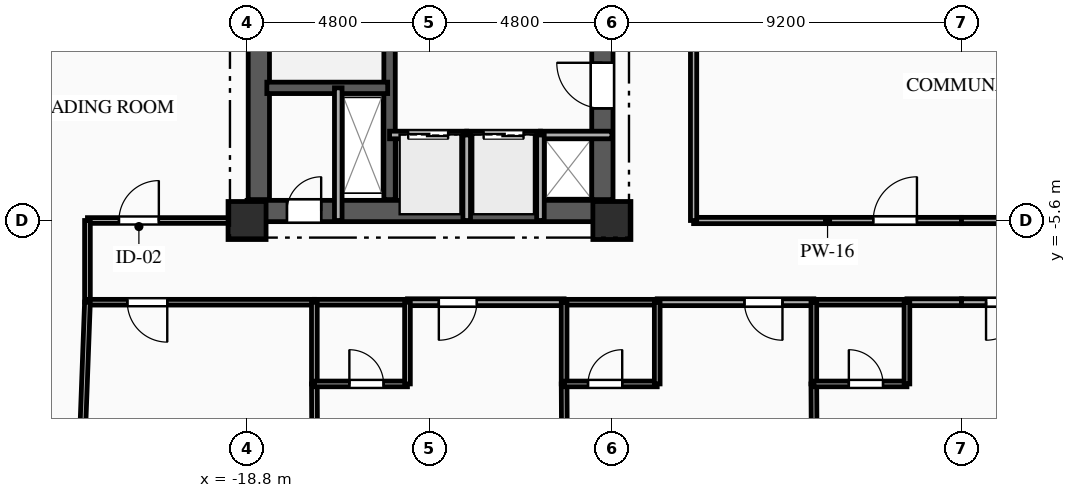
"""IFC4 building model, lengths in metres.
Left out: names, types, materials, properties, quantities, classifications, styles, units other than length and angle.
Written with IfcOpenShell. Run it as: python <this file> out.ifc"""

import sys

from ifc_helpers import new_model, si_unit, direction, frame, frame_2d, origin, origin_2d, place, context, subcontext, project, spatial, rectangle, extrude, element, fill, save


model = new_model("IFC4")
c1 = context("Model", 3, precision=1e-05, world=origin(), true_north=direction((0.0, 1.0)))
c2 = subcontext(c1, "Body", "Model", "MODEL_VIEW")
j1 = project(units=[si_unit("LENGTHUNIT", "METRE"), si_unit("PLANEANGLEUNIT", "RADIAN")], contexts=[c1])
p1 = place(None, origin())
s1 = spatial("IfcSite", under=j1, at=p1, CompositionType="ELEMENT")
p2 = place(p1, origin())
s2 = spatial("IfcBuilding", under=s1, at=p2, CompositionType="ELEMENT")
p3 = place(p2, frame((0.0, 0.0, 119.2)))
s3 = spatial("IfcBuildingStorey", under=s2, at=p3, CompositionType="ELEMENT", Elevation=119.2)
for number, where, z_axis, x_axis in (
    (1, (-18.8, -5.6, 0.0), (0.0, 0.0, 1.0), (1.0, 0.0, 0.0)),
    (2, (-9.2, -5.6, 0.0), (0.0, 0.0, 1.0), (1.0, 0.0, 0.0)),
):
    element("IfcColumn", number, at=place(p3, frame(where, z_axis=z_axis, x_axis=x_axis)), inside=s3, PredefinedType="COLUMN", context=c2, shape_type="SweptSolid", body=[
        extrude(rectangle(XDim=1.0, YDim=1.0, at=origin_2d()), origin(), (0.0, 0.0, 1.0), 3.35),
    ])
p4 = place(p3, frame((-18.8, -5.35, 0.0), z_axis=(0.0, 0.0, 1.0), x_axis=(1.0, 0.0, 0.0)))
e3 = element("IfcWall", 3, at=p4, inside=s3, PredefinedType="SHEAR", context=c2, shape_type="SweptSolid", body=[
    extrude(rectangle(XDim=9.6, YDim=0.56, at=frame_2d((4.8, 0.0))), origin(), (0.0, 0.0, 1.0), 3.045),
])
p5 = place(p4, frame((1.05, 0.0, 0.0)))
e4 = element("IfcOpeningElement", 4, at=p5, cuts=e3, PredefinedType="OPENING", context=c2, shape_type="SweptSolid", body=[
    extrude(rectangle(XDim=0.9, YDim=2.1, at=frame_2d((0.45, 1.05))), frame((0.0, 0.29, 0.0), z_axis=(0.0, -1.0, 0.0), x_axis=(1.0, 0.0, 0.0)), (0.0, 0.0, 1.0), 0.58),
])
p6 = place(p3, frame((-18.49, -5.05, 0.0), z_axis=(0.0, 0.0, 1.0), x_axis=(0.0, 1.0, 0.0)))
e5 = element("IfcWall", 5, at=p6, inside=s3, PredefinedType="SHEAR", context=c2, shape_type="SweptSolid", body=[
    extrude(rectangle(XDim=10.1, YDim=0.56, at=frame_2d((5.05, 0.0))), origin(), (0.0, 0.0, 1.0), 3.045),
])
p7 = place(p3, frame((-9.45, -5.05, 0.0), z_axis=(0.0, 0.0, 1.0), x_axis=(0.0, 1.0, 0.0)))
e6 = element("IfcWall", 6, at=p7, inside=s3, PredefinedType="SHEAR", context=c2, shape_type="SweptSolid", body=[
    extrude(rectangle(XDim=10.1, YDim=0.56, at=frame_2d((5.05, 0.0))), origin(), (0.0, 0.0, 1.0), 3.045),
])
p8 = place(p7, frame((7.15, 0.0, 0.0)))
e7 = element("IfcOpeningElement", 7, at=p8, cuts=e6, PredefinedType="OPENING", context=c2, shape_type="SweptSolid", body=[
    extrude(rectangle(XDim=0.9, YDim=2.1, at=frame_2d((0.45, 1.05))), frame((0.0, 0.29, 0.0), z_axis=(0.0, -1.0, 0.0), x_axis=(1.0, 0.0, 0.0)), (0.0, 0.0, 1.0), 0.58),
])
p9 = place(p7, frame((2.4, 0.0, 0.0)))
e8 = element("IfcOpeningElement", 8, at=p9, cuts=e6, PredefinedType="OPENING", context=c2, shape_type="SweptSolid", body=[
    extrude(rectangle(XDim=1.2, YDim=2.15, at=frame_2d((0.6, 1.075))), frame((0.0, 0.29, 0.0), z_axis=(0.0, -1.0, 0.0), x_axis=(1.0, 0.0, 0.0)), (0.0, 0.0, 1.0), 0.58),
])
p10 = place(p3, frame((-15.05, -5.05, 0.0), z_axis=(0.0, 0.0, 1.0), x_axis=(0.0, 1.0, 0.0)))
e9 = element("IfcWall", 9, at=p10, inside=s3, PredefinedType="SHEAR", context=c2, shape_type="SweptSolid", body=[
    extrude(rectangle(XDim=10.1, YDim=0.3, at=frame_2d((5.05, 0.0))), origin(), (0.0, 0.0, 1.0), 3.045),
])
p11 = place(p3, frame((-18.28, -2.11, 0.0), z_axis=(0.0, 0.0, 1.0), x_axis=(1.0, 0.0, 0.0)))
e10 = element("IfcWall", 10, at=p11, inside=s3, PredefinedType="SHEAR", context=c2, shape_type="SweptSolid", body=[
    extrude(rectangle(XDim=3.18, YDim=0.3, at=frame_2d((1.59, 0.0))), origin(), (0.0, 0.0, 1.0), 3.045),
])
p12 = place(p3, frame((-16.4, -5.6, 0.0), z_axis=(0.0, 0.0, 1.0), x_axis=(0.0, 1.0, 0.0)))
e11 = element("IfcWall", 11, at=p12, inside=s3, PredefinedType="PARTITIONING", context=c2, shape_type="SweptSolid", body=[
    extrude(rectangle(XDim=3.49, YDim=0.2, at=frame_2d((1.745, 0.0))), origin(), (0.0, 0.0, 1.0), 3.045),
])
p13 = place(p3, frame((-15.05, -3.35, 0.0), z_axis=(0.0, 0.0, 1.0), x_axis=(1.0, 0.0, 0.0)))
e12 = element("IfcWall", 12, at=p13, inside=s3, PredefinedType="PARTITIONING", context=c2, shape_type="SweptSolid", body=[
    extrude(rectangle(XDim=2.03, YDim=0.2, at=frame_2d((1.015, 0.0))), origin(), (0.0, 0.0, 1.0), 3.045),
])
p14 = place(p13, frame((0.49, 0.0, 0.0)))
e13 = element("IfcOpeningElement", 13, at=p14, cuts=e12, PredefinedType="OPENING", context=c2, shape_type="SweptSolid", body=[
    extrude(rectangle(XDim=1.05, YDim=2.1, at=frame_2d((0.525, 1.05))), frame((0.0, 0.11, 0.0), z_axis=(0.0, -1.0, 0.0), x_axis=(1.0, 0.0, 0.0)), (0.0, 0.0, 1.0), 0.22),
])
p15 = place(p3, frame((-13.02, -3.35, 0.0), z_axis=(0.0, 0.0, 1.0), x_axis=(1.0, 0.0, 0.0)))
e14 = element("IfcWall", 14, at=p15, inside=s3, PredefinedType="PARTITIONING", context=c2, shape_type="SweptSolid", body=[
    extrude(rectangle(XDim=1.94, YDim=0.2, at=frame_2d((0.97, 0.0))), origin(), (0.0, 0.0, 1.0), 3.045),
])
p16 = place(p15, frame((0.445, 0.0, 0.0)))
e15 = element("IfcOpeningElement", 15, at=p16, cuts=e14, PredefinedType="OPENING", context=c2, shape_type="SweptSolid", body=[
    extrude(rectangle(XDim=1.05, YDim=2.1, at=frame_2d((0.525, 1.05))), frame((0.0, 0.11, 0.0), z_axis=(0.0, -1.0, 0.0), x_axis=(1.0, 0.0, 0.0)), (0.0, 0.0, 1.0), 0.22),
])
p17 = place(p3, frame((-11.08, -3.35, 0.0), z_axis=(0.0, 0.0, 1.0), x_axis=(1.0, 0.0, 0.0)))
e16 = element("IfcWall", 16, at=p17, inside=s3, PredefinedType="PARTITIONING", context=c2, shape_type="SweptSolid", body=[
    extrude(rectangle(XDim=1.88, YDim=0.2, at=frame_2d((0.94, 0.0))), origin(), (0.0, 0.0, 1.0), 2.76),
])
for number, where, z_axis, x_axis in (
    (17, (-13.02, -5.6, 0.0), (0.0, 0.0, 1.0), (0.0, 1.0, 0.0)),
    (18, (-11.08, -5.6, 0.0), (0.0, 0.0, 1.0), (0.0, 1.0, 0.0)),
):
    element("IfcWall", number, at=place(p3, frame(where, z_axis=z_axis, x_axis=x_axis)), inside=s3, PredefinedType="PARTITIONING", context=c2, shape_type="SweptSolid", body=[
        extrude(rectangle(XDim=2.25, YDim=0.2, at=frame_2d((1.125, 0.0))), origin(), (0.0, 0.0, 1.0), 3.045),
    ])
p18 = place(p3, frame((-23.0, -5.6, 0.0), z_axis=(0.0, 0.0, 1.0), x_axis=(1.0, 0.0, 0.0)))
e19 = element("IfcWall", 19, at=p18, inside=s3, PredefinedType="PARTITIONING", context=c2, shape_type="SweptSolid", body=[
    extrude(rectangle(XDim=4.2, YDim=0.15, at=frame_2d((2.1, 0.0))), origin(), (0.0, 0.0, 1.0), 3.045),
])
p19 = place(p18, frame((0.829, 0.0, 0.0)))
e20 = element("IfcOpeningElement", 20, at=p19, cuts=e19, PredefinedType="OPENING", context=c2, shape_type="SweptSolid", body=[
    extrude(rectangle(XDim=1.05, YDim=2.15, at=frame_2d((0.525, 1.075))), frame((0.0, 0.085, 0.0), z_axis=(0.0, -1.0, 0.0), x_axis=(1.0, 0.0, 0.0)), (0.0, 0.0, 1.0), 0.17),
])
p20 = place(p3, frame((-23.0, -7.75, 0.0), z_axis=(0.0, 0.0, 1.0), x_axis=(0.0, 1.0, 0.0)))
e21 = element("IfcWall", 21, at=p20, inside=s3, PredefinedType="PARTITIONING", context=c2, shape_type="SweptSolid", body=[
    extrude(rectangle(XDim=2.15, YDim=0.15, at=frame_2d((1.075, 0.0))), origin(), (0.0, 0.0, 1.0), 2.7),
])
p21 = place(p3, frame((-17.029, -7.75, 0.0), z_axis=(0.0, 0.0, 1.0), x_axis=(-1.0, 0.0, 0.0)))
e22 = element("IfcWall", 22, at=p21, inside=s3, PredefinedType="PARTITIONING", context=c2, shape_type="SweptSolid", body=[
    extrude(rectangle(XDim=5.971, YDim=0.15, at=frame_2d((2.985, 0.0))), origin(), (0.0, 0.0, 1.0), 3.045),
])
p22 = place(p21, frame((3.871, 0.0, 0.0)))
e23 = element("IfcOpeningElement", 23, at=p22, cuts=e22, PredefinedType="OPENING", context=c2, shape_type="SweptSolid", body=[
    extrude(rectangle(XDim=1.05, YDim=2.15, at=frame_2d((0.525, 1.075))), frame((0.0, 0.085, 0.0), z_axis=(0.0, -1.0, 0.0), x_axis=(1.0, 0.0, 0.0)), (0.0, 0.0, 1.0), 0.17),
])
p23 = place(p3, frame((-10.457, -7.75, 0.0), z_axis=(0.0, 0.0, 1.0), x_axis=(-1.0, 0.0, 0.0)))
e24 = element("IfcWall", 24, at=p23, inside=s3, PredefinedType="PARTITIONING", context=c2, shape_type="SweptSolid", body=[
    extrude(rectangle(XDim=4.122, YDim=0.18, at=frame_2d((2.061, 0.0))), origin(), (0.0, 0.0, 1.0), 3.045),
])
p24 = place(p23, frame((2.297, 0.0, 0.0)))
e25 = element("IfcOpeningElement", 25, at=p24, cuts=e24, PredefinedType="OPENING", context=c2, shape_type="SweptSolid", body=[
    extrude(rectangle(XDim=1.0, YDim=2.15, at=frame_2d((0.5, 1.075))), frame((0.0, 0.1, 0.0), z_axis=(0.0, -1.0, 0.0), x_axis=(1.0, 0.0, 0.0)), (0.0, 0.0, 1.0), 0.2),
])
p25 = place(p3, frame((-14.579, -7.75, 0.0), z_axis=(0.0, 0.0, 1.0), x_axis=(-1.0, 0.0, 0.0)))
e26 = element("IfcWall", 26, at=p25, inside=s3, PredefinedType="PLUMBINGWALL", context=c2, shape_type="SweptSolid", body=[
    extrude(rectangle(XDim=2.45, YDim=0.15, at=frame_2d((1.225, 0.0))), origin(), (0.0, 0.0, 1.0), 3.045),
])
p26 = place(p3, frame((-3.886, -7.75, 0.0), z_axis=(0.0, 0.0, 1.0), x_axis=(-1.0, 0.0, 0.0)))
e27 = element("IfcWall", 27, at=p26, inside=s3, PredefinedType="PARTITIONING", context=c2, shape_type="SweptSolid", body=[
    extrude(rectangle(XDim=4.121, YDim=0.18, at=frame_2d((2.061, 0.0))), origin(), (0.0, 0.0, 1.0), 3.045),
])
p27 = place(p26, frame((0.825, 0.0, 0.0)))
e28 = element("IfcOpeningElement", 28, at=p27, cuts=e27, PredefinedType="OPENING", context=c2, shape_type="SweptSolid", body=[
    extrude(rectangle(XDim=1.0, YDim=2.15, at=frame_2d((0.5, 1.075))), frame((0.0, 0.1, 0.0), z_axis=(0.0, -1.0, 0.0), x_axis=(1.0, 0.0, 0.0)), (0.0, 0.0, 1.0), 0.2),
])
p28 = place(p3, frame((-8.007, -7.75, 0.0), z_axis=(0.0, 0.0, 1.0), x_axis=(-1.0, 0.0, 0.0)))
e29 = element("IfcWall", 29, at=p28, inside=s3, PredefinedType="PLUMBINGWALL", context=c2, shape_type="SweptSolid", body=[
    extrude(rectangle(XDim=2.45, YDim=0.15, at=frame_2d((1.225, 0.0))), origin(), (0.0, 0.0, 1.0), 3.045),
])
p29 = place(p3, frame((0.0, -7.75, 0.0), z_axis=(0.0, 0.0, 1.0), x_axis=(-1.0, 0.0, 0.0)))
e30 = element("IfcWall", 30, at=p29, inside=s3, PredefinedType="PARTITIONING", context=c2, shape_type="SweptSolid", body=[
    extrude(rectangle(XDim=1.436, YDim=0.18, at=frame_2d((0.718, 0.0))), origin(), (0.0, 0.0, 1.0), 3.045),
])
p30 = place(p3, frame((-1.436, -7.75, 0.0), z_axis=(0.0, 0.0, 1.0), x_axis=(-1.0, 0.0, 0.0)))
e31 = element("IfcWall", 31, at=p30, inside=s3, PredefinedType="PLUMBINGWALL", context=c2, shape_type="SweptSolid", body=[
    extrude(rectangle(XDim=2.45, YDim=0.15, at=frame_2d((1.225, 0.0))), origin(), (0.0, 0.0, 1.0), 3.045),
])
p31 = place(p3, frame((-7.05, -5.6, 0.0), z_axis=(0.0, 0.0, 1.0), x_axis=(1.0, 0.0, 0.0)))
e32 = element("IfcWall", 32, at=p31, inside=s3, PredefinedType="PARTITIONING", context=c2, shape_type="SweptSolid", body=[
    extrude(rectangle(XDim=7.05, YDim=0.165, at=frame_2d((3.525, 0.0))), origin(), (0.0, 0.0, 1.0), 2.53),
])
p32 = place(p31, frame((4.728, 0.0, 0.0)))
e33 = element("IfcOpeningElement", 33, at=p32, cuts=e32, PredefinedType="OPENING", context=c2, shape_type="SweptSolid", body=[
    extrude(rectangle(XDim=1.15, YDim=2.15, at=frame_2d((0.575, 1.075))), frame((0.0, 0.093, 0.0), z_axis=(0.0, -1.0, 0.0), x_axis=(1.0, 0.0, 0.0)), (0.0, 0.0, 1.0), 0.185),
])
p33 = place(p3, frame((2.686, -7.75, 0.0), z_axis=(0.0, 0.0, 1.0), x_axis=(-1.0, 0.0, 0.0)))
e34 = element("IfcWall", 34, at=p33, inside=s3, PredefinedType="PARTITIONING", context=c2, shape_type="SweptSolid", body=[
    extrude(rectangle(XDim=2.686, YDim=0.18, at=frame_2d((1.343, 0.0))), origin(), (0.0, 0.0, 1.0), 3.045),
])
p34 = place(p33, frame((1.04, 0.0, 0.0)))
e35 = element("IfcOpeningElement", 35, at=p34, cuts=e34, PredefinedType="OPENING", context=c2, shape_type="SweptSolid", body=[
    extrude(rectangle(XDim=1.0, YDim=2.15, at=frame_2d((0.5, 1.075))), frame((0.0, 0.1, 0.0), z_axis=(0.0, -1.0, 0.0), x_axis=(1.0, 0.0, 0.0)), (0.0, 0.0, 1.0), 0.2),
])
p35 = place(p3, frame((0.0, -5.6, 0.0), z_axis=(0.0, 0.0, 1.0), x_axis=(1.0, 0.0, 0.0)))
e36 = element("IfcWall", 36, at=p35, inside=s3, PredefinedType="PARTITIONING", context=c2, shape_type="SweptSolid", body=[
    extrude(rectangle(XDim=7.05, YDim=0.165, at=frame_2d((3.525, 0.0))), origin(), (0.0, 0.0, 1.0), 2.53),
])
p36 = place(p3, frame((-7.05, 1.45, 0.0), z_axis=(0.0, 0.0, 1.0), x_axis=(0.0, -1.0, 0.0)))
e37 = element("IfcWall", 37, at=p36, inside=s3, PredefinedType="PARTITIONING", context=c2, shape_type="SweptSolid", body=[
    extrude(rectangle(XDim=7.05, YDim=0.165, at=frame_2d((3.525, 0.0))), origin(), (0.0, 0.0, 1.0), 3.045),
])
p37 = place(p3, frame((-23.0, -7.75, 0.0), z_axis=(0.0, 0.0, 1.0), x_axis=(-0.036924695214, -0.999318050914, 0.0)))
e38 = element("IfcWall", 38, at=p37, inside=s3, PredefinedType="PARTITIONING", context=c2, shape_type="SweptSolid", body=[
    extrude(rectangle(XDim=10.176, YDim=0.15, at=frame_2d((5.088, 0.0))), origin(), (0.0, 0.0, 1.0), 3.045),
])
p38 = place(p3, frame((-17.029, -9.9, 0.0), z_axis=(0.0, 0.0, 1.0), x_axis=(0.004852348859, -0.999988227286, 0.0)))
e39 = element("IfcWall", 39, at=p38, inside=s3, PredefinedType="PARTITIONING", context=c2, shape_type="SweptSolid", body=[
    extrude(rectangle(XDim=9.056, YDim=0.15, at=frame_2d((4.528, 0.0))), origin(), (0.0, 0.0, 1.0), 3.045),
])
p39 = place(p3, frame((-17.029, -7.75, 0.0), z_axis=(0.0, 0.0, 1.0), x_axis=(0.0, -1.0, 0.0)))
e40 = element("IfcWall", 40, at=p39, inside=s3, PredefinedType="PLUMBINGWALL", context=c2, shape_type="SweptSolid", body=[
    extrude(rectangle(XDim=2.15, YDim=0.15, at=frame_2d((1.075, 0.0))), origin(), (0.0, 0.0, 1.0), 3.045),
])
p40 = place(p3, frame((-17.029, -9.9, 0.0), z_axis=(0.0, 0.0, 1.0), x_axis=(1.0, 0.0, 0.0)))
e41 = element("IfcWall", 41, at=p40, inside=s3, PredefinedType="PLUMBINGWALL", context=c2, shape_type="SweptSolid", body=[
    extrude(rectangle(XDim=2.45, YDim=0.15, at=frame_2d((1.225, 0.0))), origin(), (0.0, 0.0, 1.0), 3.045),
])
p41 = place(p40, frame((0.921, 0.0, 0.0)))
e42 = element("IfcOpeningElement", 42, at=p41, cuts=e41, PredefinedType="OPENING", context=c2, shape_type="SweptSolid", body=[
    extrude(rectangle(XDim=0.9, YDim=2.1, at=frame_2d((0.45, 1.05))), frame((0.0, 0.085, 0.0), z_axis=(0.0, -1.0, 0.0), x_axis=(1.0, 0.0, 0.0)), (0.0, 0.0, 1.0), 0.17),
])
p42 = place(p3, frame((-14.579, -9.9, 0.0), z_axis=(0.0, 0.0, 1.0), x_axis=(0.0, 1.0, 0.0)))
e43 = element("IfcWall", 43, at=p42, inside=s3, PredefinedType="PLUMBINGWALL", context=c2, shape_type="SweptSolid", body=[
    extrude(rectangle(XDim=2.15, YDim=0.15, at=frame_2d((1.075, 0.0))), origin(), (0.0, 0.0, 1.0), 3.045),
])
p43 = place(p3, frame((-10.457, -9.9, 0.0), z_axis=(0.0, 0.0, 1.0), x_axis=(0.005252948012, -0.999986203173, 0.0)))
e44 = element("IfcWall", 44, at=p43, inside=s3, PredefinedType="PARTITIONING", context=c2, shape_type="SweptSolid", body=[
    extrude(rectangle(XDim=8.366, YDim=0.15, at=frame_2d((4.183, 0.0))), origin(), (0.0, 0.0, 1.0), 3.045),
])
p44 = place(p3, frame((-10.457, -7.75, 0.0), z_axis=(0.0, 0.0, 1.0), x_axis=(0.0, -1.0, 0.0)))
e45 = element("IfcWall", 45, at=p44, inside=s3, PredefinedType="PLUMBINGWALL", context=c2, shape_type="SweptSolid", body=[
    extrude(rectangle(XDim=2.15, YDim=0.15, at=frame_2d((1.075, 0.0))), origin(), (0.0, 0.0, 1.0), 3.045),
])
p45 = place(p3, frame((-10.457, -9.9, 0.0), z_axis=(0.0, 0.0, 1.0), x_axis=(1.0, 0.0, 0.0)))
e46 = element("IfcWall", 46, at=p45, inside=s3, PredefinedType="PLUMBINGWALL", context=c2, shape_type="SweptSolid", body=[
    extrude(rectangle(XDim=2.45, YDim=0.15, at=frame_2d((1.225, 0.0))), origin(), (0.0, 0.0, 1.0), 3.045),
])
p46 = place(p45, frame((0.629, 0.0, 0.0)))
e47 = element("IfcOpeningElement", 47, at=p46, cuts=e46, PredefinedType="OPENING", context=c2, shape_type="SweptSolid", body=[
    extrude(rectangle(XDim=0.9, YDim=2.1, at=frame_2d((0.45, 1.05))), frame((0.0, 0.085, 0.0), z_axis=(0.0, -1.0, 0.0), x_axis=(1.0, 0.0, 0.0)), (0.0, 0.0, 1.0), 0.17),
])
p47 = place(p3, frame((-8.007, -9.9, 0.0), z_axis=(0.0, 0.0, 1.0), x_axis=(0.0, 1.0, 0.0)))
e48 = element("IfcWall", 48, at=p47, inside=s3, PredefinedType="PLUMBINGWALL", context=c2, shape_type="SweptSolid", body=[
    extrude(rectangle(XDim=2.15, YDim=0.15, at=frame_2d((1.075, 0.0))), origin(), (0.0, 0.0, 1.0), 3.045),
])
p48 = place(p3, frame((-3.886, -9.9, 0.0), z_axis=(0.0, 0.0, 1.0), x_axis=(0.005725643334, -0.99998360837, 0.0)))
e49 = element("IfcWall", 49, at=p48, inside=s3, PredefinedType="PARTITIONING", context=c2, shape_type="SweptSolid", body=[
    extrude(rectangle(XDim=7.675, YDim=0.15, at=frame_2d((3.838, 0.0))), origin(), (0.0, 0.0, 1.0), 3.045),
])
p49 = place(p3, frame((-3.886, -7.75, 0.0), z_axis=(0.0, 0.0, 1.0), x_axis=(0.0, -1.0, 0.0)))
e50 = element("IfcWall", 50, at=p49, inside=s3, PredefinedType="PLUMBINGWALL", context=c2, shape_type="SweptSolid", body=[
    extrude(rectangle(XDim=2.15, YDim=0.15, at=frame_2d((1.075, 0.0))), origin(), (0.0, 0.0, 1.0), 3.045),
])
p50 = place(p3, frame((-3.886, -9.9, 0.0), z_axis=(0.0, 0.0, 1.0), x_axis=(1.0, 0.0, 0.0)))
e51 = element("IfcWall", 51, at=p50, inside=s3, PredefinedType="PLUMBINGWALL", context=c2, shape_type="SweptSolid", body=[
    extrude(rectangle(XDim=2.45, YDim=0.15, at=frame_2d((1.225, 0.0))), origin(), (0.0, 0.0, 1.0), 3.045),
])
p51 = place(p50, frame((0.921, 0.0, 0.0)))
e52 = element("IfcOpeningElement", 52, at=p51, cuts=e51, PredefinedType="OPENING", context=c2, shape_type="SweptSolid", body=[
    extrude(rectangle(XDim=0.9, YDim=2.1, at=frame_2d((0.45, 1.05))), frame((0.0, 0.085, 0.0), z_axis=(0.0, -1.0, 0.0), x_axis=(1.0, 0.0, 0.0)), (0.0, 0.0, 1.0), 0.17),
])
p52 = place(p3, frame((-1.436, -9.9, 0.0), z_axis=(0.0, 0.0, 1.0), x_axis=(0.0, 1.0, 0.0)))
e53 = element("IfcWall", 53, at=p52, inside=s3, PredefinedType="PLUMBINGWALL", context=c2, shape_type="SweptSolid", body=[
    extrude(rectangle(XDim=2.15, YDim=0.15, at=frame_2d((1.075, 0.0))), origin(), (0.0, 0.0, 1.0), 3.045),
])
p53 = place(p5, origin())
e54 = element("IfcDoor", 54, at=p53, inside=s3, OperationType="SINGLE_SWING_RIGHT", PredefinedType="DOOR", context=c2, shape_type="SweptSolid", body=[
    extrude(rectangle(XDim=0.9, YDim=2.1, at=frame_2d((0.45, 1.05))), frame((0.0, 0.025, 0.0), z_axis=(0.0, -1.0, 0.0), x_axis=(1.0, 0.0, 0.0)), (0.0, 0.0, 1.0), 0.05),
])
fill(e4, e54)
p54 = place(p14, origin())
e55 = element("IfcDoor", 55, at=p54, inside=s3, OperationType="DOUBLE_DOOR_SLIDING", PredefinedType="DOOR", context=c2, shape_type="SweptSolid", body=[
    extrude(rectangle(XDim=1.05, YDim=2.1, at=frame_2d((0.525, 1.05))), frame((0.0, 0.025, 0.0), z_axis=(0.0, -1.0, 0.0), x_axis=(1.0, 0.0, 0.0)), (0.0, 0.0, 1.0), 0.05),
])
fill(e13, e55)
p55 = place(p16, origin())
e56 = element("IfcDoor", 56, at=p55, inside=s3, OperationType="DOUBLE_DOOR_SLIDING", PredefinedType="DOOR", context=c2, shape_type="SweptSolid", body=[
    extrude(rectangle(XDim=1.05, YDim=2.1, at=frame_2d((0.525, 1.05))), frame((0.0, 0.025, 0.0), z_axis=(0.0, -1.0, 0.0), x_axis=(1.0, 0.0, 0.0)), (0.0, 0.0, 1.0), 0.05),
])
fill(e15, e56)
p56 = place(p9, origin())
e57 = element("IfcDoor", 57, at=p56, inside=s3, OperationType="SINGLE_SWING_RIGHT", PredefinedType="DOOR", context=c2, shape_type="SweptSolid", body=[
    extrude(rectangle(XDim=1.2, YDim=2.15, at=frame_2d((0.6, 1.075))), frame((0.0, 0.025, 0.0), z_axis=(0.0, -1.0, 0.0), x_axis=(1.0, 0.0, 0.0)), (0.0, 0.0, 1.0), 0.05),
])
fill(e8, e57)
p57 = place(p19, origin())
e58 = element("IfcDoor", 58, at=p57, inside=s3, OperationType="SINGLE_SWING_RIGHT", PredefinedType="DOOR", context=c2, shape_type="SweptSolid", body=[
    extrude(rectangle(XDim=1.05, YDim=2.15, at=frame_2d((0.525, 1.075))), frame((0.0, 0.025, 0.0), z_axis=(0.0, -1.0, 0.0), x_axis=(1.0, 0.0, 0.0)), (0.0, 0.0, 1.0), 0.05),
])
fill(e20, e58)
p58 = place(p22, origin())
e59 = element("IfcDoor", 59, at=p58, inside=s3, OperationType="SINGLE_SWING_LEFT", PredefinedType="DOOR", context=c2, shape_type="SweptSolid", body=[
    extrude(rectangle(XDim=1.05, YDim=2.15, at=frame_2d((0.525, 1.075))), frame((0.0, 0.025, 0.0), z_axis=(0.0, -1.0, 0.0), x_axis=(1.0, 0.0, 0.0)), (0.0, 0.0, 1.0), 0.05),
])
fill(e23, e59)
p59 = place(p24, origin())
e60 = element("IfcDoor", 60, at=p59, inside=s3, OperationType="SINGLE_SWING_RIGHT", PredefinedType="DOOR", context=c2, shape_type="SweptSolid", body=[
    extrude(rectangle(XDim=1.0, YDim=2.15, at=frame_2d((0.5, 1.075))), frame((0.0, 0.025, 0.0), z_axis=(0.0, -1.0, 0.0), x_axis=(1.0, 0.0, 0.0)), (0.0, 0.0, 1.0), 0.05),
])
fill(e25, e60)
p60 = place(p27, origin())
e61 = element("IfcDoor", 61, at=p60, inside=s3, OperationType="SINGLE_SWING_LEFT", PredefinedType="DOOR", context=c2, shape_type="SweptSolid", body=[
    extrude(rectangle(XDim=1.0, YDim=2.15, at=frame_2d((0.5, 1.075))), frame((0.0, 0.025, 0.0), z_axis=(0.0, -1.0, 0.0), x_axis=(1.0, 0.0, 0.0)), (0.0, 0.0, 1.0), 0.05),
])
fill(e28, e61)
p61 = place(p32, origin())
e62 = element("IfcDoor", 62, at=p61, inside=s3, OperationType="SINGLE_SWING_RIGHT", PredefinedType="DOOR", context=c2, shape_type="SweptSolid", body=[
    extrude(rectangle(XDim=1.15, YDim=2.15, at=frame_2d((0.575, 1.075))), frame((0.0, 0.025, 0.0), z_axis=(0.0, -1.0, 0.0), x_axis=(1.0, 0.0, 0.0)), (0.0, 0.0, 1.0), 0.05),
])
fill(e33, e62)
p62 = place(p34, origin())
e63 = element("IfcDoor", 63, at=p62, inside=s3, OperationType="SINGLE_SWING_RIGHT", PredefinedType="DOOR", context=c2, shape_type="SweptSolid", body=[
    extrude(rectangle(XDim=1.0, YDim=2.15, at=frame_2d((0.5, 1.075))), frame((0.0, 0.025, 0.0), z_axis=(0.0, -1.0, 0.0), x_axis=(1.0, 0.0, 0.0)), (0.0, 0.0, 1.0), 0.05),
])
fill(e35, e63)
p63 = place(p41, origin())
e64 = element("IfcDoor", 64, at=p63, inside=s3, OperationType="SINGLE_SWING_LEFT", PredefinedType="DOOR", context=c2, shape_type="SweptSolid", body=[
    extrude(rectangle(XDim=0.9, YDim=2.1, at=frame_2d((0.45, 1.05))), frame((0.0, 0.025, 0.0), z_axis=(0.0, -1.0, 0.0), x_axis=(1.0, 0.0, 0.0)), (0.0, 0.0, 1.0), 0.05),
])
fill(e42, e64)
p64 = place(p46, origin())
e65 = element("IfcDoor", 65, at=p64, inside=s3, OperationType="SINGLE_SWING_RIGHT", PredefinedType="DOOR", context=c2, shape_type="SweptSolid", body=[
    extrude(rectangle(XDim=0.9, YDim=2.1, at=frame_2d((0.45, 1.05))), frame((0.0, 0.025, 0.0), z_axis=(0.0, -1.0, 0.0), x_axis=(1.0, 0.0, 0.0)), (0.0, 0.0, 1.0), 0.05),
])
fill(e47, e65)
p65 = place(p51, origin())
e66 = element("IfcDoor", 66, at=p65, inside=s3, OperationType="SINGLE_SWING_LEFT", PredefinedType="DOOR", context=c2, shape_type="SweptSolid", body=[
    extrude(rectangle(XDim=0.9, YDim=2.1, at=frame_2d((0.45, 1.05))), frame((0.0, 0.025, 0.0), z_axis=(0.0, -1.0, 0.0), x_axis=(1.0, 0.0, 0.0)), (0.0, 0.0, 1.0), 0.05),
])
fill(e52, e66)
save(model, sys.argv[1])
